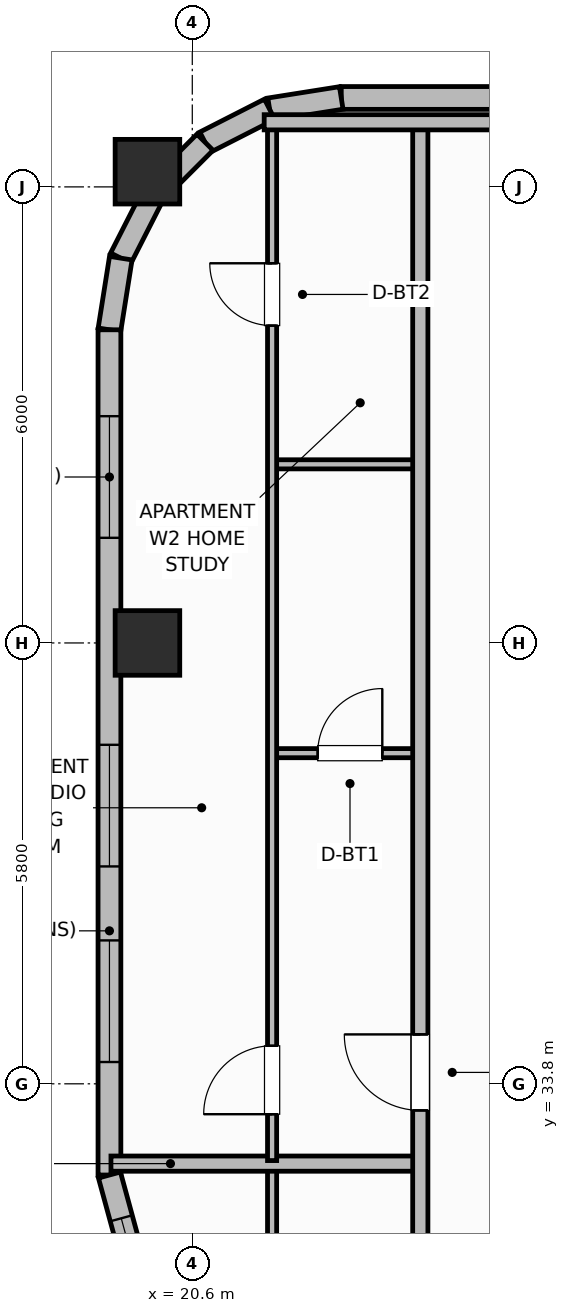
"""IFC4 building model, lengths in metres.
Left out: names, types, materials, properties, quantities, classifications, styles, units other than length and angle.
Written with IfcOpenShell. Run it as: python <this file> out.ifc"""

import sys

from ifc_helpers import new_model, si_unit, direction, frame, frame_2d, origin, origin_2d, place, context, subcontext, project, spatial, rectangle, extrude, element, fill, save


model = new_model("IFC4")
c1 = context("Model", 3, precision=1e-05, world=origin(), true_north=direction((0.0, 1.0)))
c2 = subcontext(c1, "Body", "Model", "MODEL_VIEW")
j1 = project(units=[si_unit("LENGTHUNIT", "METRE"), si_unit("PLANEANGLEUNIT", "RADIAN")], contexts=[c1])
p1 = place(None, origin())
s1 = spatial("IfcSite", under=j1, at=p1, CompositionType="ELEMENT")
p2 = place(p1, origin())
s2 = spatial("IfcBuilding", under=s1, at=p2, CompositionType="ELEMENT")
p3 = place(p2, frame((0.0, 0.0, 248.0)))
s3 = spatial("IfcBuildingStorey", under=s2, at=p3, CompositionType="ELEMENT", Elevation=248.0)
for number, where, z_axis, x_axis in (
    (1, (20.01, 39.6, 0.0), (0.0, 0.0, 1.0), (1.0, 0.0, 0.0)),
    (2, (20.01, 45.8, 0.0), (0.0, 0.0, 1.0), (1.0, 0.0, 0.0)),
):
    element("IfcColumn", number, at=place(p3, frame(where, z_axis=z_axis, x_axis=x_axis)), inside=s3, PredefinedType="COLUMN", context=c2, shape_type="SweptSolid", body=[
        extrude(rectangle(XDim=0.85, YDim=0.85, at=origin_2d()), origin(), (0.0, 0.0, 1.0), 3.7),
    ])
p4 = place(p3, frame((55.84, 46.77, 0.0), z_axis=(0.0, 0.0, 1.0), x_axis=(-1.0, 0.0, 0.0)))
e3 = element("IfcWall", 3, at=p4, inside=s3, PredefinedType="SOLIDWALL", context=c2, shape_type="SweptSolid", body=[
    extrude(rectangle(XDim=33.28, YDim=0.3, at=frame_2d((16.64, 0.0))), origin(), (0.0, 0.0, 1.0), 2.73),
])
p5 = place(p4, frame((4.547, 0.0, 0.76)))
e4 = element("IfcOpeningElement", 4, at=p5, cuts=e3, PredefinedType="OPENING", context=c2, shape_type="SweptSolid", body=[
    extrude(rectangle(XDim=1.8, YDim=1.85, at=frame_2d((0.9, 0.925))), frame((0.0, 0.16, 0.0), z_axis=(0.0, -1.0, 0.0), x_axis=(1.0, 0.0, 0.0)), (0.0, 0.0, 1.0), 0.32),
])
p6 = place(p4, frame((7.745, 0.0, 0.76)))
e5 = element("IfcOpeningElement", 5, at=p6, cuts=e3, PredefinedType="OPENING", context=c2, shape_type="SweptSolid", body=[
    extrude(rectangle(XDim=1.8, YDim=1.85, at=frame_2d((0.9, 0.925))), frame((0.0, 0.16, 0.0), z_axis=(0.0, -1.0, 0.0), x_axis=(1.0, 0.0, 0.0)), (0.0, 0.0, 1.0), 0.32),
])
p7 = place(p4, frame((14.141, 0.0, 0.76)))
e6 = element("IfcOpeningElement", 6, at=p7, cuts=e3, PredefinedType="OPENING", context=c2, shape_type="SweptSolid", body=[
    extrude(rectangle(XDim=1.8, YDim=1.85, at=frame_2d((0.9, 0.925))), frame((0.0, 0.16, 0.0), z_axis=(0.0, -1.0, 0.0), x_axis=(1.0, 0.0, 0.0)), (0.0, 0.0, 1.0), 0.32),
])
p8 = place(p4, frame((17.339, 0.0, 0.76)))
e7 = element("IfcOpeningElement", 7, at=p8, cuts=e3, PredefinedType="OPENING", context=c2, shape_type="SweptSolid", body=[
    extrude(rectangle(XDim=1.8, YDim=1.85, at=frame_2d((0.9, 0.925))), frame((0.0, 0.16, 0.0), z_axis=(0.0, -1.0, 0.0), x_axis=(1.0, 0.0, 0.0)), (0.0, 0.0, 1.0), 0.32),
])
p9 = place(p4, frame((23.735, 0.0, 0.76)))
e8 = element("IfcOpeningElement", 8, at=p9, cuts=e3, PredefinedType="OPENING", context=c2, shape_type="SweptSolid", body=[
    extrude(rectangle(XDim=1.8, YDim=1.85, at=frame_2d((0.9, 0.925))), frame((0.0, 0.16, 0.0), z_axis=(0.0, -1.0, 0.0), x_axis=(1.0, 0.0, 0.0)), (0.0, 0.0, 1.0), 0.32),
])
p10 = place(p4, frame((26.933, 0.0, 0.76)))
e9 = element("IfcOpeningElement", 9, at=p10, cuts=e3, PredefinedType="OPENING", context=c2, shape_type="SweptSolid", body=[
    extrude(rectangle(XDim=1.8, YDim=1.85, at=frame_2d((0.9, 0.925))), frame((0.0, 0.16, 0.0), z_axis=(0.0, -1.0, 0.0), x_axis=(1.0, 0.0, 0.0)), (0.0, 0.0, 1.0), 0.32),
])
p11 = place(p3, frame((22.56, 46.77, 0.0), z_axis=(0.0, 0.0, 1.0), x_axis=(-0.987669453596, -0.156553666304, 0.0)))
e10 = element("IfcWall", 10, at=p11, inside=s3, PredefinedType="SOLIDWALL", context=c2, shape_type="SweptSolid", body=[
    extrude(rectangle(XDim=0.954, YDim=0.3, at=frame_2d((0.477, 0.0))), origin(), (0.0, 0.0, 1.0), 2.73),
])
p12 = place(p3, frame((21.617, 46.621, 0.0), z_axis=(0.0, 0.0, 1.0), x_axis=(-0.891023873617, -0.45395644796, 0.0)))
e11 = element("IfcWall", 11, at=p12, inside=s3, PredefinedType="SOLIDWALL", context=c2, shape_type="SweptSolid", body=[
    extrude(rectangle(XDim=0.954, YDim=0.3, at=frame_2d((0.477, 0.0))), origin(), (0.0, 0.0, 1.0), 2.73),
])
p13 = place(p3, frame((20.767, 46.188, 0.0), z_axis=(0.0, 0.0, 1.0), x_axis=(-0.707106781187, -0.707106781187, 0.0)))
e12 = element("IfcWall", 12, at=p13, inside=s3, PredefinedType="SOLIDWALL", context=c2, shape_type="SweptSolid", body=[
    extrude(rectangle(XDim=0.954, YDim=0.3, at=frame_2d((0.477, 0.0))), origin(), (0.0, 0.0, 1.0), 2.73),
])
p14 = place(p3, frame((20.093, 45.513, 0.0), z_axis=(0.0, 0.0, 1.0), x_axis=(-0.454159573051, -0.890920356825, 0.0)))
e13 = element("IfcWall", 13, at=p14, inside=s3, PredefinedType="SOLIDWALL", context=c2, shape_type="SweptSolid", body=[
    extrude(rectangle(XDim=0.954, YDim=0.3, at=frame_2d((0.477, 0.0))), origin(), (0.0, 0.0, 1.0), 2.73),
])
p15 = place(p3, frame((19.659, 44.663, 0.0), z_axis=(0.0, 0.0, 1.0), x_axis=(-0.156304114255, -0.987708977314, 0.0)))
e14 = element("IfcWall", 14, at=p15, inside=s3, PredefinedType="SOLIDWALL", context=c2, shape_type="SweptSolid", body=[
    extrude(rectangle(XDim=0.954, YDim=0.3, at=frame_2d((0.477, 0.0))), origin(), (0.0, 0.0, 1.0), 2.73),
])
p16 = place(p3, frame((19.51, 43.72, 0.0), z_axis=(0.0, 0.0, 1.0), x_axis=(0.0, -1.0, 0.0)))
e15 = element("IfcWall", 15, at=p16, inside=s3, PredefinedType="SOLIDWALL", context=c2, shape_type="SweptSolid", body=[
    extrude(rectangle(XDim=11.12, YDim=0.3, at=frame_2d((5.56, 0.0))), origin(), (0.0, 0.0, 1.0), 2.73),
])
p17 = place(p16, frame((1.137, 0.0, 0.71)))
e16 = element("IfcOpeningElement", 16, at=p17, cuts=e15, PredefinedType="OPENING", context=c2, shape_type="SweptSolid", body=[
    extrude(rectangle(XDim=1.6, YDim=1.9, at=frame_2d((0.8, 0.95))), frame((0.0, 0.16, 0.0), z_axis=(0.0, -1.0, 0.0), x_axis=(1.0, 0.0, 0.0)), (0.0, 0.0, 1.0), 0.32),
])
p18 = place(p16, frame((5.46, 0.0, 0.71)))
e17 = element("IfcOpeningElement", 17, at=p18, cuts=e15, PredefinedType="OPENING", context=c2, shape_type="SweptSolid", body=[
    extrude(rectangle(XDim=1.6, YDim=1.9, at=frame_2d((0.8, 0.95))), frame((0.0, 0.16, 0.0), z_axis=(0.0, -1.0, 0.0), x_axis=(1.0, 0.0, 0.0)), (0.0, 0.0, 1.0), 0.32),
])
p19 = place(p16, frame((8.033, 0.0, 0.71)))
e18 = element("IfcOpeningElement", 18, at=p19, cuts=e15, PredefinedType="OPENING", context=c2, shape_type="SweptSolid", body=[
    extrude(rectangle(XDim=1.6, YDim=1.9, at=frame_2d((0.8, 0.95))), frame((0.0, 0.16, 0.0), z_axis=(0.0, -1.0, 0.0), x_axis=(1.0, 0.0, 0.0)), (0.0, 0.0, 1.0), 0.32),
])
p20 = place(p3, frame((19.51, 32.6, 0.0), z_axis=(0.0, 0.0, 1.0), x_axis=(0.263135522356, -0.964758880174, 0.0)))
e19 = element("IfcWall", 19, at=p20, inside=s3, PredefinedType="SOLIDWALL", context=c2, shape_type="SweptSolid", body=[
    extrude(rectangle(XDim=2.281, YDim=0.3, at=frame_2d((1.14, 0.0))), origin(), (0.0, 0.0, 1.0), 2.73),
])
p21 = place(p20, frame((0.59, 0.0, 0.92)))
e20 = element("IfcOpeningElement", 20, at=p21, cuts=e19, PredefinedType="OPENING", context=c2, shape_type="SweptSolid", body=[
    extrude(rectangle(XDim=1.1, YDim=1.65, at=frame_2d((0.55, 0.825))), frame((0.0, 0.16, 0.0), z_axis=(0.0, -1.0, 0.0), x_axis=(1.0, 0.0, 0.0)), (0.0, 0.0, 1.0), 0.32),
])
p22 = place(p3, frame((21.65, 9.99, 0.0), z_axis=(0.0, 0.0, 1.0), x_axis=(0.0, 1.0, 0.0)))
e21 = element("IfcWall", 21, at=p22, inside=s3, PredefinedType="PARTITIONING", context=c2, shape_type="SweptSolid", body=[
    extrude(rectangle(XDim=22.72, YDim=0.12, at=frame_2d((11.36, 0.0))), origin(), (0.0, 0.0, 1.0), 2.56),
])
p23 = place(p22, frame((0.41, 0.0, 0.0)))
e22 = element("IfcOpeningElement", 22, at=p23, cuts=e21, PredefinedType="OPENING", context=c2, shape_type="SweptSolid", body=[
    extrude(rectangle(XDim=0.9, YDim=2.1, at=frame_2d((0.45, 1.05))), frame((0.0, 0.07, 0.0), z_axis=(0.0, -1.0, 0.0), x_axis=(1.0, 0.0, 0.0)), (0.0, 0.0, 1.0), 0.14),
])
p24 = place(p22, frame((15.535, 0.0, 0.0)))
e23 = element("IfcOpeningElement", 23, at=p24, cuts=e21, PredefinedType="OPENING", context=c2, shape_type="SweptSolid", body=[
    extrude(rectangle(XDim=0.82, YDim=2.08, at=frame_2d((0.41, 1.04))), frame((0.0, 0.07, 0.0), z_axis=(0.0, -1.0, 0.0), x_axis=(1.0, 0.0, 0.0)), (0.0, 0.0, 1.0), 0.14),
])
p25 = place(p3, frame((19.53, 32.75, 0.0), z_axis=(0.0, 0.0, 1.0), x_axis=(1.0, 0.0, 0.0)))
e24 = element("IfcWall", 24, at=p25, inside=s3, PredefinedType="PARTITIONING", context=c2, shape_type="SweptSolid", body=[
    extrude(rectangle(XDim=4.07, YDim=0.2, at=frame_2d((2.035, 0.0))), origin(), (0.0, 0.0, 1.0), 2.56),
])
p26 = place(p3, frame((21.65, 38.15, 0.0), z_axis=(0.0, 0.0, 1.0), x_axis=(1.0, 0.0, 0.0)))
e25 = element("IfcWall", 25, at=p26, inside=s3, PredefinedType="PARTITIONING", context=c2, shape_type="SweptSolid", body=[
    extrude(rectangle(XDim=1.95, YDim=0.12, at=frame_2d((0.975, 0.0))), origin(), (0.0, 0.0, 1.0), 2.56),
])
p27 = place(p26, frame((0.6, 0.0, 0.0)))
e26 = element("IfcOpeningElement", 26, at=p27, cuts=e25, PredefinedType="OPENING", context=c2, shape_type="SweptSolid", body=[
    extrude(rectangle(XDim=0.85, YDim=2.1, at=frame_2d((0.425, 1.05))), frame((0.0, 0.07, 0.0), z_axis=(0.0, -1.0, 0.0), x_axis=(1.0, 0.0, 0.0)), (0.0, 0.0, 1.0), 0.14),
])
p28 = place(p3, frame((21.65, 41.95, 0.0), z_axis=(0.0, 0.0, 1.0), x_axis=(1.0, 0.0, 0.0)))
e27 = element("IfcWall", 27, at=p28, inside=s3, PredefinedType="PARTITIONING", context=c2, shape_type="SweptSolid", body=[
    extrude(rectangle(XDim=1.95, YDim=0.12, at=frame_2d((0.975, 0.0))), origin(), (0.0, 0.0, 1.0), 2.56),
])
p29 = place(p3, frame((21.65, 32.79, 0.0), z_axis=(0.0, 0.0, 1.0), x_axis=(0.0, 1.0, 0.0)))
e28 = element("IfcWall", 28, at=p29, inside=s3, PredefinedType="PARTITIONING", context=c2, shape_type="SweptSolid", body=[
    extrude(rectangle(XDim=13.62, YDim=0.12, at=frame_2d((6.81, 0.0))), origin(), (0.0, 0.0, 1.0), 2.56),
])
p30 = place(p29, frame((0.61, 0.0, 0.0)))
e29 = element("IfcOpeningElement", 29, at=p30, cuts=e28, PredefinedType="OPENING", context=c2, shape_type="SweptSolid", body=[
    extrude(rectangle(XDim=0.9, YDim=2.1, at=frame_2d((0.45, 1.05))), frame((0.0, 0.07, 0.0), z_axis=(0.0, -1.0, 0.0), x_axis=(1.0, 0.0, 0.0)), (0.0, 0.0, 1.0), 0.14),
])
p31 = place(p29, frame((10.985, 0.0, 0.0)))
e30 = element("IfcOpeningElement", 30, at=p31, cuts=e28, PredefinedType="OPENING", context=c2, shape_type="SweptSolid", body=[
    extrude(rectangle(XDim=0.82, YDim=2.08, at=frame_2d((0.41, 1.04))), frame((0.0, 0.07, 0.0), z_axis=(0.0, -1.0, 0.0), x_axis=(1.0, 0.0, 0.0)), (0.0, 0.0, 1.0), 0.14),
])
p32 = place(p3, frame((23.6, 9.95, 0.0), z_axis=(0.0, 0.0, 1.0), x_axis=(0.0, 1.0, 0.0)))
e31 = element("IfcWall", 31, at=p32, inside=s3, PredefinedType="PARTITIONING", context=c2, shape_type="SweptSolid", body=[
    extrude(rectangle(XDim=36.5, YDim=0.2, at=frame_2d((18.25, 0.0))), origin(), (0.0, 0.0, 1.0), 2.56),
])
p33 = place(p32, frame((3.25, 0.0, 0.0)))
e32 = element("IfcOpeningElement", 32, at=p33, cuts=e31, PredefinedType="OPENING", context=c2, shape_type="SweptSolid", body=[
    extrude(rectangle(XDim=1.0, YDim=2.15, at=frame_2d((0.5, 1.075))), frame((0.0, 0.11, 0.0), z_axis=(0.0, -1.0, 0.0), x_axis=(1.0, 0.0, 0.0)), (0.0, 0.0, 1.0), 0.22),
])
p34 = place(p32, frame((23.5, 0.0, 0.0)))
e33 = element("IfcOpeningElement", 33, at=p34, cuts=e31, PredefinedType="OPENING", context=c2, shape_type="SweptSolid", body=[
    extrude(rectangle(XDim=1.0, YDim=2.15, at=frame_2d((0.5, 1.075))), frame((0.0, 0.11, 0.0), z_axis=(0.0, -1.0, 0.0), x_axis=(1.0, 0.0, 0.0)), (0.0, 0.0, 1.0), 0.22),
])
p35 = place(p3, frame((21.546, 46.45, 0.0), z_axis=(0.0, 0.0, 1.0), x_axis=(1.0, 0.0, 0.0)))
e34 = element("IfcWall", 34, at=p35, inside=s3, PredefinedType="PARTITIONING", context=c2, shape_type="SweptSolid", body=[
    extrude(rectangle(XDim=3.754, YDim=0.2, at=frame_2d((1.877, 0.0))), origin(), (0.0, 0.0, 1.0), 2.56),
])
p36 = place(p17, origin())
e35 = element("IfcWindow", 35, at=p36, inside=s3, PartitioningType="SINGLE_PANEL", PredefinedType="WINDOW", context=c2, shape_type="SweptSolid", body=[
    extrude(rectangle(XDim=1.6, YDim=1.9, at=frame_2d((0.8, 0.95))), frame((0.0, 0.03, 0.0), z_axis=(0.0, -1.0, 0.0), x_axis=(1.0, 0.0, 0.0)), (0.0, 0.0, 1.0), 0.06),
])
fill(e16, e35)
p37 = place(p18, origin())
e36 = element("IfcWindow", 36, at=p37, inside=s3, PartitioningType="SINGLE_PANEL", PredefinedType="WINDOW", context=c2, shape_type="SweptSolid", body=[
    extrude(rectangle(XDim=1.6, YDim=1.9, at=frame_2d((0.8, 0.95))), frame((0.0, 0.03, 0.0), z_axis=(0.0, -1.0, 0.0), x_axis=(1.0, 0.0, 0.0)), (0.0, 0.0, 1.0), 0.06),
])
fill(e17, e36)
p38 = place(p19, origin())
e37 = element("IfcWindow", 37, at=p38, inside=s3, PartitioningType="SINGLE_PANEL", PredefinedType="WINDOW", context=c2, shape_type="SweptSolid", body=[
    extrude(rectangle(XDim=1.6, YDim=1.9, at=frame_2d((0.8, 0.95))), frame((0.0, 0.03, 0.0), z_axis=(0.0, -1.0, 0.0), x_axis=(1.0, 0.0, 0.0)), (0.0, 0.0, 1.0), 0.06),
])
fill(e18, e37)
p39 = place(p21, origin())
e38 = element("IfcWindow", 38, at=p39, inside=s3, PartitioningType="SINGLE_PANEL", PredefinedType="WINDOW", context=c2, shape_type="SweptSolid", body=[
    extrude(rectangle(XDim=1.1, YDim=1.65, at=frame_2d((0.55, 0.825))), frame((0.0, 0.03, 0.0), z_axis=(0.0, -1.0, 0.0), x_axis=(1.0, 0.0, 0.0)), (0.0, 0.0, 1.0), 0.06),
])
fill(e20, e38)
p40 = place(p27, origin())
e39 = element("IfcDoor", 39, at=p40, inside=s3, OperationType="SINGLE_SWING_RIGHT", PredefinedType="DOOR", context=c2, shape_type="SweptSolid", body=[
    extrude(rectangle(XDim=0.85, YDim=2.1, at=frame_2d((0.425, 1.05))), frame((0.0, 0.025, 0.0), z_axis=(0.0, -1.0, 0.0), x_axis=(1.0, 0.0, 0.0)), (0.0, 0.0, 1.0), 0.05),
])
fill(e26, e39)
p41 = place(p30, origin())
e40 = element("IfcDoor", 40, at=p41, inside=s3, OperationType="SINGLE_SWING_LEFT", PredefinedType="DOOR", context=c2, shape_type="SweptSolid", body=[
    extrude(rectangle(XDim=0.9, YDim=2.1, at=frame_2d((0.45, 1.05))), frame((0.0, 0.025, 0.0), z_axis=(0.0, -1.0, 0.0), x_axis=(1.0, 0.0, 0.0)), (0.0, 0.0, 1.0), 0.05),
])
fill(e29, e40)
p42 = place(p31, origin())
e41 = element("IfcDoor", 41, at=p42, inside=s3, OperationType="SINGLE_SWING_RIGHT", PredefinedType="DOOR", context=c2, shape_type="SweptSolid", body=[
    extrude(rectangle(XDim=0.82, YDim=2.08, at=frame_2d((0.41, 1.04))), frame((0.0, 0.025, 0.0), z_axis=(0.0, -1.0, 0.0), x_axis=(1.0, 0.0, 0.0)), (0.0, 0.0, 1.0), 0.05),
])
fill(e30, e41)
p43 = place(p34, origin())
e42 = element("IfcDoor", 42, at=p43, inside=s3, OperationType="SINGLE_SWING_RIGHT", PredefinedType="DOOR", context=c2, shape_type="SweptSolid", body=[
    extrude(rectangle(XDim=1.0, YDim=2.15, at=frame_2d((0.5, 1.075))), frame((0.0, 0.025, 0.0), z_axis=(0.0, -1.0, 0.0), x_axis=(1.0, 0.0, 0.0)), (0.0, 0.0, 1.0), 0.05),
])
fill(e33, e42)
save(model, sys.argv[1])
